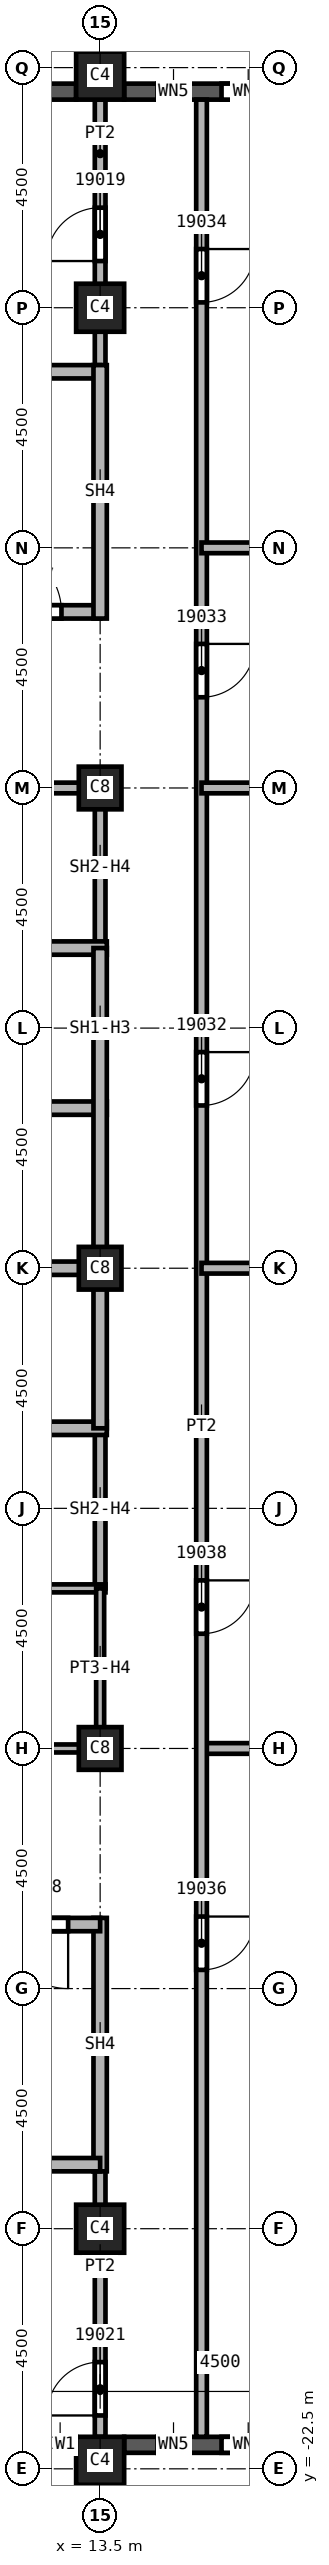
"""IFC4 building model, lengths in metres.
Left out: names, types, materials, properties, quantities, classifications, styles, units other than length and angle.
Written with IfcOpenShell. Run it as: python <this file> out.ifc"""

import sys

from ifc_helpers import new_model, si_unit, direction, frame, frame_2d, origin, origin_2d, place, context, subcontext, project, spatial, rectangle, extrude, element, fill, save


model = new_model("IFC4")
c1 = context("Model", 3, precision=1e-05, world=origin(), true_north=direction((0.0, 1.0)))
c2 = subcontext(c1, "Body", "Model", "MODEL_VIEW")
j1 = project(units=[si_unit("LENGTHUNIT", "METRE"), si_unit("PLANEANGLEUNIT", "RADIAN")], contexts=[c1])
p1 = place(None, origin())
s1 = spatial("IfcSite", under=j1, at=p1, CompositionType="ELEMENT")
p2 = place(p1, origin())
s2 = spatial("IfcBuilding", under=s1, at=p2, CompositionType="ELEMENT")
p3 = place(p2, frame((0.0, 0.0, 282.0)))
s3 = spatial("IfcBuildingStorey", under=s2, at=p3, CompositionType="ELEMENT", Elevation=282.0)
for number, where, z_axis, x_axis in (
    (1, (13.5, 18.0, 0.0), (0.0, 0.0, 1.0), (1.0, 0.0, 0.0)),
    (2, (13.5, -18.0, 0.0), (0.0, 0.0, 1.0), (1.0, 0.0, 0.0)),
):
    element("IfcColumn", number, at=place(p3, frame(where, z_axis=z_axis, x_axis=x_axis)), inside=s3, PredefinedType="COLUMN", context=c2, shape_type="SweptSolid", body=[
        extrude(rectangle(XDim=0.9, YDim=0.9, at=origin_2d()), origin(), (0.0, 0.0, 1.0), 3.72),
    ])
for number, where, z_axis, x_axis in (
    (3, (13.5, 0.0, 0.0), (0.0, 0.0, 1.0), (1.0, 0.0, 0.0)),
    (4, (13.5, 9.0, 0.0), (0.0, 0.0, 1.0), (1.0, 0.0, 0.0)),
    (5, (13.5, -9.0, 0.0), (0.0, 0.0, 1.0), (1.0, 0.0, 0.0)),
):
    element("IfcColumn", number, at=place(p3, frame(where, z_axis=z_axis, x_axis=x_axis)), inside=s3, PredefinedType="COLUMN", context=c2, shape_type="SweptSolid", body=[
        extrude(rectangle(XDim=0.8, YDim=0.8, at=origin_2d()), origin(), (0.0, 0.0, 1.0), 3.72),
    ])
for number, where, z_axis, x_axis in (
    (6, (13.5, 22.35, 0.0), (0.0, 0.0, 1.0), (1.0, 0.0, 0.0)),
    (7, (13.5, -22.35, 0.0), (0.0, 0.0, 1.0), (1.0, 0.0, 0.0)),
):
    element("IfcColumn", number, at=place(p3, frame(where, z_axis=z_axis, x_axis=x_axis)), inside=s3, PredefinedType="COLUMN", context=c2, shape_type="SweptSolid", body=[
        extrude(rectangle(XDim=0.9, YDim=0.9, at=origin_2d()), origin(), (0.0, 0.0, 1.0), 3.72),
    ])
p4 = place(p3, frame((9.45, -22.05, 0.0), z_axis=(0.0, 0.0, 1.0), x_axis=(1.0, 0.0, 0.0)))
e8 = element("IfcWall", 8, at=p4, inside=s3, PredefinedType="SOLIDWALL", context=c2, shape_type="SweptSolid", body=[
    extrude(rectangle(XDim=3.6, YDim=0.3, at=frame_2d((1.8, 0.0))), origin(), (0.0, 0.0, 1.0), 3.12),
])
p5 = place(p4, frame((0.6, 0.0, 0.8)))
e9 = element("IfcOpeningElement", 9, at=p5, cuts=e8, PredefinedType="OPENING", context=c2, shape_type="SweptSolid", body=[
    extrude(rectangle(XDim=2.4, YDim=1.95, at=frame_2d((1.2, 0.975))), frame((0.0, 0.15, 0.0), z_axis=(0.0, -1.0, 0.0), x_axis=(1.0, 0.0, 0.0)), (0.0, 0.0, 1.0), 0.3),
])
p6 = place(p3, frame((13.95, -22.05, 0.0), z_axis=(0.0, 0.0, 1.0), x_axis=(1.0, 0.0, 0.0)))
e10 = element("IfcWall", 10, at=p6, inside=s3, PredefinedType="SOLIDWALL", context=c2, shape_type="SweptSolid", body=[
    extrude(rectangle(XDim=3.6, YDim=0.3, at=frame_2d((1.8, 0.0))), origin(), (0.0, 0.0, 1.0), 3.12),
])
p7 = place(p6, frame((0.625, 0.0, 0.8)))
e11 = element("IfcOpeningElement", 11, at=p7, cuts=e10, PredefinedType="OPENING", context=c2, shape_type="SweptSolid", body=[
    extrude(rectangle(XDim=0.6, YDim=1.95, at=frame_2d((0.3, 0.975))), frame((0.0, 0.15, 0.0), z_axis=(0.0, -1.0, 0.0), x_axis=(1.0, 0.0, 0.0)), (0.0, 0.0, 1.0), 0.3),
])
p8 = place(p6, frame((1.825, 0.0, 0.8)))
e12 = element("IfcOpeningElement", 12, at=p8, cuts=e10, PredefinedType="OPENING", context=c2, shape_type="SweptSolid", body=[
    extrude(rectangle(XDim=1.0, YDim=1.95, at=frame_2d((0.5, 0.975))), frame((0.0, 0.15, 0.0), z_axis=(0.0, -1.0, 0.0), x_axis=(1.0, 0.0, 0.0)), (0.0, 0.0, 1.0), 0.3),
])
p9 = place(p3, frame((17.55, 22.05, 0.0), z_axis=(0.0, 0.0, 1.0), x_axis=(-1.0, 0.0, 0.0)))
e13 = element("IfcWall", 13, at=p9, inside=s3, PredefinedType="SOLIDWALL", context=c2, shape_type="SweptSolid", body=[
    extrude(rectangle(XDim=3.6, YDim=0.3, at=frame_2d((1.8, 0.0))), origin(), (0.0, 0.0, 1.0), 3.12),
])
p10 = place(p9, frame((0.775, 0.0, 0.8)))
e14 = element("IfcOpeningElement", 14, at=p10, cuts=e13, PredefinedType="OPENING", context=c2, shape_type="SweptSolid", body=[
    extrude(rectangle(XDim=1.0, YDim=1.95, at=frame_2d((0.5, 0.975))), frame((0.0, 0.15, 0.0), z_axis=(0.0, -1.0, 0.0), x_axis=(1.0, 0.0, 0.0)), (0.0, 0.0, 1.0), 0.3),
])
p11 = place(p9, frame((2.375, 0.0, 0.8)))
e15 = element("IfcOpeningElement", 15, at=p11, cuts=e13, PredefinedType="OPENING", context=c2, shape_type="SweptSolid", body=[
    extrude(rectangle(XDim=0.6, YDim=1.95, at=frame_2d((0.3, 0.975))), frame((0.0, 0.15, 0.0), z_axis=(0.0, -1.0, 0.0), x_axis=(1.0, 0.0, 0.0)), (0.0, 0.0, 1.0), 0.3),
])
p12 = place(p3, frame((13.05, 22.05, 0.0), z_axis=(0.0, 0.0, 1.0), x_axis=(-1.0, 0.0, 0.0)))
e16 = element("IfcWall", 16, at=p12, inside=s3, PredefinedType="SOLIDWALL", context=c2, shape_type="SweptSolid", body=[
    extrude(rectangle(XDim=3.6, YDim=0.3, at=frame_2d((1.8, 0.0))), origin(), (0.0, 0.0, 1.0), 3.12),
])
p13 = place(p12, frame((0.6, 0.0, 0.8)))
e17 = element("IfcOpeningElement", 17, at=p13, cuts=e16, PredefinedType="OPENING", context=c2, shape_type="SweptSolid", body=[
    extrude(rectangle(XDim=2.4, YDim=1.95, at=frame_2d((1.2, 0.975))), frame((0.0, 0.15, 0.0), z_axis=(0.0, -1.0, 0.0), x_axis=(1.0, 0.0, 0.0)), (0.0, 0.0, 1.0), 0.3),
])
p14 = place(p3, frame((13.5, -21.9, 0.0), z_axis=(0.0, 0.0, 1.0), x_axis=(0.0, 1.0, 0.0)))
e18 = element("IfcWall", 18, at=p14, inside=s3, PredefinedType="PARTITIONING", context=c2, shape_type="SweptSolid", body=[
    extrude(rectangle(XDim=5.225, YDim=0.2, at=frame_2d((2.612, 0.0))), origin(), (0.0, 0.0, 1.0), 3.72),
])
p15 = place(p14, frame((0.4, 0.0, 0.0)))
e19 = element("IfcOpeningElement", 19, at=p15, cuts=e18, PredefinedType="OPENING", context=c2, shape_type="SweptSolid", body=[
    extrude(rectangle(XDim=1.0, YDim=2.1, at=frame_2d((0.5, 1.05))), frame((0.0, 0.1, 0.0), z_axis=(0.0, -1.0, 0.0), x_axis=(1.0, 0.0, 0.0)), (0.0, 0.0, 1.0), 0.2),
])
p16 = place(p3, frame((13.5, 16.675, 0.0), z_axis=(0.0, 0.0, 1.0), x_axis=(0.0, 1.0, 0.0)))
e20 = element("IfcWall", 20, at=p16, inside=s3, PredefinedType="PARTITIONING", context=c2, shape_type="SweptSolid", body=[
    extrude(rectangle(XDim=5.225, YDim=0.2, at=frame_2d((2.612, 0.0))), origin(), (0.0, 0.0, 1.0), 3.72),
])
p17 = place(p16, frame((2.2, 0.0, 0.0)))
e21 = element("IfcOpeningElement", 21, at=p17, cuts=e20, PredefinedType="OPENING", context=c2, shape_type="SweptSolid", body=[
    extrude(rectangle(XDim=1.0, YDim=2.1, at=frame_2d((0.5, 1.05))), frame((0.0, 0.1, 0.0), z_axis=(0.0, -1.0, 0.0), x_axis=(1.0, 0.0, 0.0)), (0.0, 0.0, 1.0), 0.2),
])
p18 = place(p3, frame((15.4, -9.0, 0.0), z_axis=(0.0, 0.0, 1.0), x_axis=(1.0, 0.0, 0.0)))
e22 = element("IfcWall", 22, at=p18, inside=s3, PredefinedType="PARTITIONING", context=c2, shape_type="SweptSolid", body=[
    extrude(rectangle(XDim=11.15, YDim=0.2, at=frame_2d((5.575, 0.0))), origin(), (0.0, 0.0, 1.0), 3.72),
])
p19 = place(p3, frame((15.4, 21.9, 0.0), z_axis=(0.0, 0.0, 1.0), x_axis=(0.0, -1.0, 0.0)))
e23 = element("IfcWall", 23, at=p19, inside=s3, PredefinedType="PARTITIONING", context=c2, shape_type="SweptSolid", body=[
    extrude(rectangle(XDim=43.8, YDim=0.2, at=frame_2d((21.9, 0.0))), origin(), (0.0, 0.0, 1.0), 3.72),
])
p20 = place(p19, frame((17.85, 0.0, 0.0)))
e24 = element("IfcOpeningElement", 24, at=p20, cuts=e23, PredefinedType="OPENING", context=c2, shape_type="SweptSolid", body=[
    extrude(rectangle(XDim=1.0, YDim=2.1, at=frame_2d((0.5, 1.05))), frame((0.0, 0.1, 0.0), z_axis=(0.0, -1.0, 0.0), x_axis=(1.0, 0.0, 0.0)), (0.0, 0.0, 1.0), 0.2),
])
p21 = place(p19, frame((10.2, 0.0, 0.0)))
e25 = element("IfcOpeningElement", 25, at=p21, cuts=e23, PredefinedType="OPENING", context=c2, shape_type="SweptSolid", body=[
    extrude(rectangle(XDim=1.0, YDim=2.1, at=frame_2d((0.5, 1.05))), frame((0.0, 0.1, 0.0), z_axis=(0.0, -1.0, 0.0), x_axis=(1.0, 0.0, 0.0)), (0.0, 0.0, 1.0), 0.2),
])
p22 = place(p19, frame((2.8, 0.0, 0.0)))
e26 = element("IfcOpeningElement", 26, at=p22, cuts=e23, PredefinedType="OPENING", context=c2, shape_type="SweptSolid", body=[
    extrude(rectangle(XDim=1.0, YDim=2.1, at=frame_2d((0.5, 1.05))), frame((0.0, 0.1, 0.0), z_axis=(0.0, -1.0, 0.0), x_axis=(1.0, 0.0, 0.0)), (0.0, 0.0, 1.0), 0.2),
])
p23 = place(p19, frame((34.05, 0.0, 0.0)))
e27 = element("IfcOpeningElement", 27, at=p23, cuts=e23, PredefinedType="OPENING", context=c2, shape_type="SweptSolid", body=[
    extrude(rectangle(XDim=1.0, YDim=2.1, at=frame_2d((0.5, 1.05))), frame((0.0, 0.1, 0.0), z_axis=(0.0, -1.0, 0.0), x_axis=(1.0, 0.0, 0.0)), (0.0, 0.0, 1.0), 0.2),
])
p24 = place(p19, frame((27.75, 0.0, 0.0)))
e28 = element("IfcOpeningElement", 28, at=p24, cuts=e23, PredefinedType="OPENING", context=c2, shape_type="SweptSolid", body=[
    extrude(rectangle(XDim=1.0, YDim=2.1, at=frame_2d((0.5, 1.05))), frame((0.0, 0.1, 0.0), z_axis=(0.0, -1.0, 0.0), x_axis=(1.0, 0.0, 0.0)), (0.0, 0.0, 1.0), 0.2),
])
for number, where, z_axis, x_axis in (
    (29, (15.4, 9.0, 0.0), (0.0, 0.0, 1.0), (1.0, 0.0, 0.0)),
    (30, (15.4, 13.5, 0.0), (0.0, 0.0, 1.0), (1.0, 0.0, 0.0)),
    (31, (26.55, 0.0, 0.0), (0.0, 0.0, 1.0), (-1.0, 0.0, 0.0)),
):
    element("IfcWall", number, at=place(p3, frame(where, z_axis=z_axis, x_axis=x_axis)), inside=s3, PredefinedType="PARTITIONING", context=c2, shape_type="SweptSolid", body=[
        extrude(rectangle(XDim=11.15, YDim=0.2, at=frame_2d((5.575, 0.0))), origin(), (0.0, 0.0, 1.0), 3.72),
    ])
for number, where, z_axis, x_axis in (
    (32, (10.5, 9.0, 0.0), (0.0, 0.0, 1.0), (1.0, 0.0, 0.0)),
    (33, (13.5, -3.0, 0.0), (0.0, 0.0, 1.0), (0.0, -1.0, 0.0)),
):
    element("IfcWall", number, at=place(p3, frame(where, z_axis=z_axis, x_axis=x_axis)), inside=s3, PredefinedType="SOLIDWALL", context=c2, shape_type="SweptSolid", body=[
        extrude(rectangle(XDim=3.0, YDim=0.2, at=frame_2d((1.5, 0.0))), origin(), (0.0, 0.0, 1.0), 3.042),
    ])
p25 = place(p3, frame((13.5, 9.1, 0.0), z_axis=(0.0, 0.0, 1.0), x_axis=(0.0, -1.0, 0.0)))
e34 = element("IfcWall", 34, at=p25, inside=s3, PredefinedType="SOLIDWALL", context=c2, shape_type="SweptSolid", body=[
    extrude(rectangle(XDim=3.1, YDim=0.2, at=frame_2d((1.55, 0.0))), origin(), (0.0, 0.0, 1.0), 3.042),
])
p26 = place(p3, frame((4.375, -3.0, 0.0), z_axis=(0.0, 0.0, 1.0), x_axis=(1.0, 0.0, 0.0)))
e35 = element("IfcWall", 35, at=p26, inside=s3, PredefinedType="SOLIDWALL", context=c2, shape_type="SweptSolid", body=[
    extrude(rectangle(XDim=9.25, YDim=0.25, at=frame_2d((4.625, 0.0))), origin(), (0.0, 0.0, 1.0), 3.72),
])
p27 = place(p26, frame((4.875, 0.0, 0.0)))
e36 = element("IfcOpeningElement", 36, at=p27, cuts=e35, PredefinedType="OPENING", context=c2, shape_type="SweptSolid", body=[
    extrude(rectangle(XDim=1.1, YDim=2.1, at=frame_2d((0.55, 1.05))), frame((0.0, 0.125, 0.0), z_axis=(0.0, -1.0, 0.0), x_axis=(1.0, 0.0, 0.0)), (0.0, 0.0, 1.0), 0.25),
])
p28 = place(p3, frame((7.5, 3.0, 0.0), z_axis=(0.0, 0.0, 1.0), x_axis=(1.0, 0.0, 0.0)))
e37 = element("IfcWall", 37, at=p28, inside=s3, PredefinedType="SOLIDWALL", context=c2, shape_type="SweptSolid", body=[
    extrude(rectangle(XDim=6.125, YDim=0.25, at=frame_2d((3.062, 0.0))), origin(), (0.0, 0.0, 1.0), 3.72),
])
p29 = place(p28, frame((1.75, 0.0, 0.0)))
e38 = element("IfcOpeningElement", 38, at=p29, cuts=e37, PredefinedType="OPENING", context=c2, shape_type="SweptSolid", body=[
    extrude(rectangle(XDim=1.1, YDim=2.1, at=frame_2d((0.55, 1.05))), frame((0.0, 0.125, 0.0), z_axis=(0.0, -1.0, 0.0), x_axis=(1.0, 0.0, 0.0)), (0.0, 0.0, 1.0), 0.25),
])
for number, where, z_axis, x_axis in (
    (39, (10.5, 0.0, 0.0), (0.0, 0.0, 1.0), (1.0, 0.0, 0.0)),
    (40, (10.5, 6.0, 0.0), (0.0, 0.0, 1.0), (1.0, 0.0, 0.0)),
):
    element("IfcWall", number, at=place(p3, frame(where, z_axis=z_axis, x_axis=x_axis)), inside=s3, PredefinedType="SOLIDWALL", context=c2, shape_type="SweptSolid", body=[
        extrude(rectangle(XDim=3.125, YDim=0.25, at=frame_2d((1.562, 0.0))), origin(), (0.0, 0.0, 1.0), 3.72),
    ])
p30 = place(p3, frame((13.5, 6.0, 0.0), z_axis=(0.0, 0.0, 1.0), x_axis=(0.0, -1.0, 0.0)))
e41 = element("IfcWall", 41, at=p30, inside=s3, PredefinedType="SOLIDWALL", context=c2, shape_type="SweptSolid", body=[
    extrude(rectangle(XDim=9.0, YDim=0.25, at=frame_2d((4.5, 0.0))), origin(), (0.0, 0.0, 1.0), 3.042),
])
p31 = place(p3, frame((4.375, 12.3, 0.0), z_axis=(0.0, 0.0, 1.0), x_axis=(1.0, 0.0, 0.0)))
e42 = element("IfcWall", 42, at=p31, inside=s3, PredefinedType="SOLIDWALL", context=c2, shape_type="SweptSolid", body=[
    extrude(rectangle(XDim=9.125, YDim=0.25, at=frame_2d((4.562, 0.0))), origin(), (0.0, 0.0, 1.0), 3.72),
])
p32 = place(p31, frame((7.2, 0.0, 0.0)))
e43 = element("IfcOpeningElement", 43, at=p32, cuts=e42, PredefinedType="OPENING", context=c2, shape_type="SweptSolid", body=[
    extrude(rectangle(XDim=1.2, YDim=2.1, at=frame_2d((0.6, 1.05))), frame((0.0, 0.125, 0.0), z_axis=(0.0, -1.0, 0.0), x_axis=(1.0, 0.0, 0.0)), (0.0, 0.0, 1.0), 0.25),
])
p33 = place(p3, frame((4.375, 16.8, 0.0), z_axis=(0.0, 0.0, 1.0), x_axis=(1.0, 0.0, 0.0)))
e44 = element("IfcWall", 44, at=p33, inside=s3, PredefinedType="SOLIDWALL", context=c2, shape_type="SweptSolid", body=[
    extrude(rectangle(XDim=9.125, YDim=0.25, at=frame_2d((4.562, 0.0))), origin(), (0.0, 0.0, 1.0), 3.72),
])
p34 = place(p3, frame((13.5, -16.925, 0.0), z_axis=(0.0, 0.0, 1.0), x_axis=(0.0, 1.0, 0.0)))
e45 = element("IfcWall", 45, at=p34, inside=s3, PredefinedType="SOLIDWALL", context=c2, shape_type="SweptSolid", body=[
    extrude(rectangle(XDim=4.75, YDim=0.25, at=frame_2d((2.375, 0.0))), origin(), (0.0, 0.0, 1.0), 3.72),
])
p35 = place(p3, frame((13.5, -16.8, 0.0), z_axis=(0.0, 0.0, 1.0), x_axis=(-1.0, 0.0, 0.0)))
e46 = element("IfcWall", 46, at=p35, inside=s3, PredefinedType="SOLIDWALL", context=c2, shape_type="SweptSolid", body=[
    extrude(rectangle(XDim=9.125, YDim=0.25, at=frame_2d((4.562, 0.0))), origin(), (0.0, 0.0, 1.0), 3.72),
])
p36 = place(p3, frame((13.5, -12.3, 0.0), z_axis=(0.0, 0.0, 1.0), x_axis=(-1.0, 0.0, 0.0)))
e47 = element("IfcWall", 47, at=p36, inside=s3, PredefinedType="SOLIDWALL", context=c2, shape_type="SweptSolid", body=[
    extrude(rectangle(XDim=9.125, YDim=0.25, at=frame_2d((4.562, 0.0))), origin(), (0.0, 0.0, 1.0), 3.72),
])
p37 = place(p36, frame((0.6, 0.0, 0.0)))
e48 = element("IfcOpeningElement", 48, at=p37, cuts=e47, PredefinedType="OPENING", context=c2, shape_type="SweptSolid", body=[
    extrude(rectangle(XDim=1.2, YDim=2.1, at=frame_2d((0.6, 1.05))), frame((0.0, 0.125, 0.0), z_axis=(0.0, -1.0, 0.0), x_axis=(1.0, 0.0, 0.0)), (0.0, 0.0, 1.0), 0.25),
])
p38 = place(p3, frame((13.5, 12.175, 0.0), z_axis=(0.0, 0.0, 1.0), x_axis=(0.0, 1.0, 0.0)))
e49 = element("IfcWall", 49, at=p38, inside=s3, PredefinedType="SOLIDWALL", context=c2, shape_type="SweptSolid", body=[
    extrude(rectangle(XDim=4.75, YDim=0.25, at=frame_2d((2.375, 0.0))), origin(), (0.0, 0.0, 1.0), 3.72),
])
p39 = place(p3, frame((10.5, -6.0, 0.0), z_axis=(0.0, 0.0, 1.0), x_axis=(1.0, 0.0, 0.0)))
e50 = element("IfcWall", 50, at=p39, inside=s3, PredefinedType="PARTITIONING", context=c2, shape_type="SweptSolid", body=[
    extrude(rectangle(XDim=3.1, YDim=0.15, at=frame_2d((1.55, 0.0))), origin(), (0.0, 0.0, 1.0), 3.72),
])
p40 = place(p3, frame((13.5, -9.0, 0.0), z_axis=(0.0, 0.0, 1.0), x_axis=(-1.0, 0.0, 0.0)))
e51 = element("IfcWall", 51, at=p40, inside=s3, PredefinedType="PARTITIONING", context=c2, shape_type="SweptSolid", body=[
    extrude(rectangle(XDim=3.0, YDim=0.15, at=frame_2d((1.5, 0.0))), origin(), (0.0, 0.0, 1.0), 3.042),
])
p41 = place(p3, frame((13.5, -6.0, 0.0), z_axis=(0.0, 0.0, 1.0), x_axis=(0.0, -1.0, 0.0)))
e52 = element("IfcWall", 52, at=p41, inside=s3, PredefinedType="PARTITIONING", context=c2, shape_type="SweptSolid", body=[
    extrude(rectangle(XDim=3.075, YDim=0.15, at=frame_2d((1.538, 0.0))), origin(), (0.0, 0.0, 1.0), 3.042),
])
p42 = place(p32, origin())
e53 = element("IfcDoor", 53, at=p42, inside=s3, OperationType="SINGLE_SWING_RIGHT", PredefinedType="DOOR", context=c2, shape_type="SweptSolid", body=[
    extrude(rectangle(XDim=1.2, YDim=2.1, at=frame_2d((0.6, 1.05))), frame((0.0, 0.025, 0.0), z_axis=(0.0, -1.0, 0.0), x_axis=(1.0, 0.0, 0.0)), (0.0, 0.0, 1.0), 0.05),
])
fill(e43, e53)
p43 = place(p37, origin())
e54 = element("IfcDoor", 54, at=p43, inside=s3, OperationType="SINGLE_SWING_LEFT", PredefinedType="DOOR", context=c2, shape_type="SweptSolid", body=[
    extrude(rectangle(XDim=1.2, YDim=2.1, at=frame_2d((0.6, 1.05))), frame((0.0, 0.025, 0.0), z_axis=(0.0, -1.0, 0.0), x_axis=(1.0, 0.0, 0.0)), (0.0, 0.0, 1.0), 0.05),
])
fill(e48, e54)
p44 = place(p17, origin())
e55 = element("IfcDoor", 55, at=p44, inside=s3, OperationType="SINGLE_SWING_RIGHT", PredefinedType="DOOR", context=c2, shape_type="SweptSolid", body=[
    extrude(rectangle(XDim=1.0, YDim=2.1, at=frame_2d((0.5, 1.05))), frame((0.0, 0.025, 0.0), z_axis=(0.0, -1.0, 0.0), x_axis=(1.0, 0.0, 0.0)), (0.0, 0.0, 1.0), 0.05),
])
fill(e21, e55)
p45 = place(p15, origin())
e56 = element("IfcDoor", 56, at=p45, inside=s3, OperationType="SINGLE_SWING_RIGHT", PredefinedType="DOOR", context=c2, shape_type="SweptSolid", body=[
    extrude(rectangle(XDim=1.0, YDim=2.1, at=frame_2d((0.5, 1.05))), frame((0.0, 0.025, 0.0), z_axis=(0.0, -1.0, 0.0), x_axis=(1.0, 0.0, 0.0)), (0.0, 0.0, 1.0), 0.05),
])
fill(e19, e56)
p46 = place(p20, origin())
e57 = element("IfcDoor", 57, at=p46, inside=s3, OperationType="SINGLE_SWING_LEFT", PredefinedType="DOOR", context=c2, shape_type="SweptSolid", body=[
    extrude(rectangle(XDim=1.0, YDim=2.1, at=frame_2d((0.5, 1.05))), frame((0.0, 0.025, 0.0), z_axis=(0.0, -1.0, 0.0), x_axis=(1.0, 0.0, 0.0)), (0.0, 0.0, 1.0), 0.05),
])
fill(e24, e57)
p47 = place(p21, origin())
e58 = element("IfcDoor", 58, at=p47, inside=s3, OperationType="SINGLE_SWING_RIGHT", PredefinedType="DOOR", context=c2, shape_type="SweptSolid", body=[
    extrude(rectangle(XDim=1.0, YDim=2.1, at=frame_2d((0.5, 1.05))), frame((0.0, 0.025, 0.0), z_axis=(0.0, -1.0, 0.0), x_axis=(1.0, 0.0, 0.0)), (0.0, 0.0, 1.0), 0.05),
])
fill(e25, e58)
p48 = place(p22, origin())
e59 = element("IfcDoor", 59, at=p48, inside=s3, OperationType="SINGLE_SWING_LEFT", PredefinedType="DOOR", context=c2, shape_type="SweptSolid", body=[
    extrude(rectangle(XDim=1.0, YDim=2.1, at=frame_2d((0.5, 1.05))), frame((0.0, 0.025, 0.0), z_axis=(0.0, -1.0, 0.0), x_axis=(1.0, 0.0, 0.0)), (0.0, 0.0, 1.0), 0.05),
])
fill(e26, e59)
p49 = place(p23, origin())
e60 = element("IfcDoor", 60, at=p49, inside=s3, OperationType="SINGLE_SWING_LEFT", PredefinedType="DOOR", context=c2, shape_type="SweptSolid", body=[
    extrude(rectangle(XDim=1.0, YDim=2.1, at=frame_2d((0.5, 1.05))), frame((0.0, 0.025, 0.0), z_axis=(0.0, -1.0, 0.0), x_axis=(1.0, 0.0, 0.0)), (0.0, 0.0, 1.0), 0.05),
])
fill(e27, e60)
p50 = place(p24, origin())
e61 = element("IfcDoor", 61, at=p50, inside=s3, OperationType="SINGLE_SWING_LEFT", PredefinedType="DOOR", context=c2, shape_type="SweptSolid", body=[
    extrude(rectangle(XDim=1.0, YDim=2.1, at=frame_2d((0.5, 1.05))), frame((0.0, 0.025, 0.0), z_axis=(0.0, -1.0, 0.0), x_axis=(1.0, 0.0, 0.0)), (0.0, 0.0, 1.0), 0.05),
])
fill(e28, e61)
p51 = place(p7, origin())
e62 = element("IfcWindow", 62, at=p51, inside=s3, PartitioningType="SINGLE_PANEL", PredefinedType="WINDOW", context=c2, shape_type="SweptSolid", body=[
    extrude(rectangle(XDim=0.6, YDim=1.95, at=frame_2d((0.3, 0.975))), frame((0.0, 0.03, 0.0), z_axis=(0.0, -1.0, 0.0), x_axis=(1.0, 0.0, 0.0)), (0.0, 0.0, 1.0), 0.06),
])
fill(e11, e62)
p52 = place(p8, origin())
e63 = element("IfcWindow", 63, at=p52, inside=s3, PartitioningType="SINGLE_PANEL", PredefinedType="WINDOW", context=c2, shape_type="SweptSolid", body=[
    extrude(rectangle(XDim=1.0, YDim=1.95, at=frame_2d((0.5, 0.975))), frame((0.0, 0.03, 0.0), z_axis=(0.0, -1.0, 0.0), x_axis=(1.0, 0.0, 0.0)), (0.0, 0.0, 1.0), 0.06),
])
fill(e12, e63)
p53 = place(p10, origin())
e64 = element("IfcWindow", 64, at=p53, inside=s3, PartitioningType="SINGLE_PANEL", PredefinedType="WINDOW", context=c2, shape_type="SweptSolid", body=[
    extrude(rectangle(XDim=1.0, YDim=1.95, at=frame_2d((0.5, 0.975))), frame((0.0, 0.03, 0.0), z_axis=(0.0, -1.0, 0.0), x_axis=(1.0, 0.0, 0.0)), (0.0, 0.0, 1.0), 0.06),
])
fill(e14, e64)
p54 = place(p11, origin())
e65 = element("IfcWindow", 65, at=p54, inside=s3, PartitioningType="SINGLE_PANEL", PredefinedType="WINDOW", context=c2, shape_type="SweptSolid", body=[
    extrude(rectangle(XDim=0.6, YDim=1.95, at=frame_2d((0.3, 0.975))), frame((0.0, 0.03, 0.0), z_axis=(0.0, -1.0, 0.0), x_axis=(1.0, 0.0, 0.0)), (0.0, 0.0, 1.0), 0.06),
])
fill(e15, e65)
save(model, sys.argv[1])
